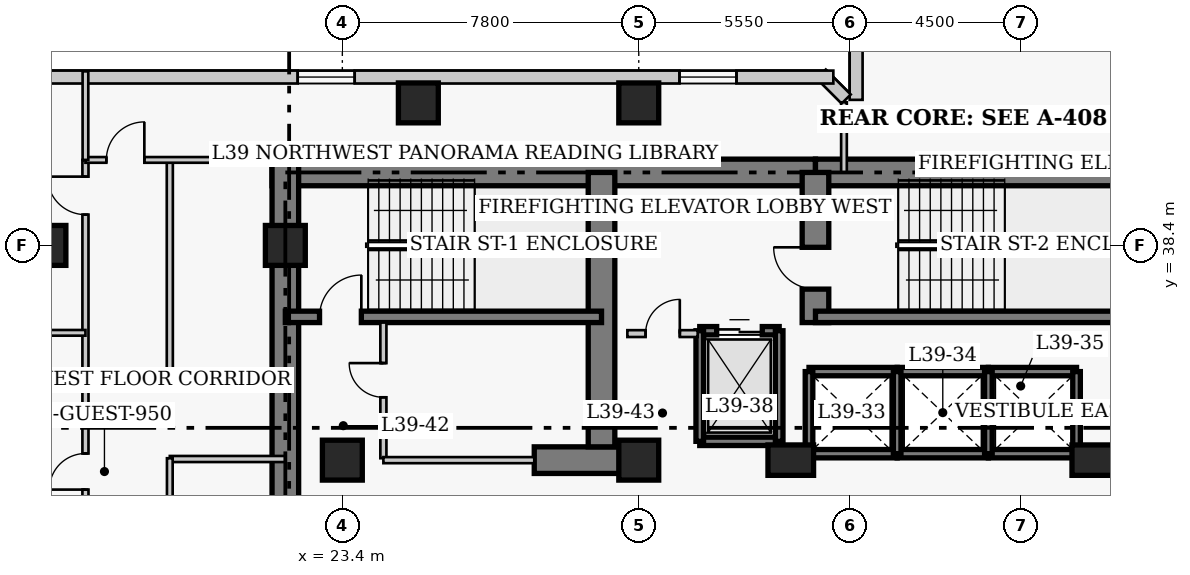
"""IFC4 building model, lengths in metres.
Left out: names, types, materials, properties, quantities, classifications, styles, units other than length and angle.
Written with IfcOpenShell. Run it as: python <this file> out.ifc"""

import sys

from ifc_helpers import new_model, si_unit, direction, frame, frame_2d, origin, origin_2d, place, context, subcontext, project, spatial, rectangle, extrude, element, fill, save


model = new_model("IFC4")
c1 = context("Model", 3, precision=1e-05, world=origin(), true_north=direction((0.0, 1.0)))
c2 = subcontext(c1, "Body", "Model", "MODEL_VIEW")
j1 = project(units=[si_unit("LENGTHUNIT", "METRE"), si_unit("PLANEANGLEUNIT", "RADIAN")], contexts=[c1])
p1 = place(None, origin())
s1 = spatial("IfcSite", under=j1, at=p1, CompositionType="ELEMENT")
p2 = place(p1, origin())
s2 = spatial("IfcBuilding", under=s1, at=p2, CompositionType="ELEMENT")
p3 = place(p2, frame((0.0, 0.0, 157.4)))
s3 = spatial("IfcBuildingStorey", under=s2, at=p3, CompositionType="ELEMENT", Elevation=157.4)
p4 = place(p3, frame((21.55, 40.32, 0.0), z_axis=(0.0, 0.0, 1.0), x_axis=(1.0, 0.0, 0.0)))
e1 = element("IfcWall", 1, at=p4, inside=s3, PredefinedType="SHEAR", context=c2, shape_type="SweptSolid", body=[
    extrude(rectangle(XDim=14.3, YDim=0.7, at=frame_2d((7.15, 0.0))), origin(), (0.0, 0.0, 1.0), 3.8),
])
p5 = place(p3, frame((35.85, 40.32, 0.0), z_axis=(0.0, 0.0, 1.0), x_axis=(1.0, 0.0, 0.0)))
e2 = element("IfcWall", 2, at=p5, inside=s3, PredefinedType="SHEAR", context=c2, shape_type="SweptSolid", body=[
    extrude(rectangle(XDim=12.6, YDim=0.7, at=frame_2d((6.3, 0.0))), origin(), (0.0, 0.0, 1.0), 3.8),
])
p6 = place(p3, frame((21.9, 27.05, 0.0), z_axis=(0.0, 0.0, 1.0), x_axis=(0.0, 1.0, 0.0)))
e3 = element("IfcWall", 3, at=p6, inside=s3, PredefinedType="SHEAR", context=c2, shape_type="SweptSolid", body=[
    extrude(rectangle(XDim=13.62, YDim=0.7, at=frame_2d((6.81, 0.0))), origin(), (0.0, 0.0, 1.0), 3.8),
])
p7 = place(p3, frame((28.45, 32.75, 0.0), z_axis=(0.0, 0.0, 1.0), x_axis=(1.0, 0.0, 0.0)))
e4 = element("IfcWall", 4, at=p7, inside=s3, PredefinedType="SHEAR", context=c2, shape_type="SweptSolid", body=[
    extrude(rectangle(XDim=2.4, YDim=0.7, at=frame_2d((1.2, 0.0))), origin(), (0.0, 0.0, 1.0), 3.8),
])
p8 = place(p3, frame((30.22, 33.1, 0.0), z_axis=(0.0, 0.0, 1.0), x_axis=(0.0, 1.0, 0.0)))
e5 = element("IfcWall", 5, at=p8, inside=s3, PredefinedType="SHEAR", context=c2, shape_type="SweptSolid", body=[
    extrude(rectangle(XDim=7.22, YDim=0.7, at=frame_2d((3.61, 0.0))), origin(), (0.0, 0.0, 1.0), 3.8),
])
p9 = place(p3, frame((35.85, 36.37, 0.0), z_axis=(0.0, 0.0, 1.0), x_axis=(0.0, 1.0, 0.0)))
e6 = element("IfcWall", 6, at=p9, inside=s3, PredefinedType="SHEAR", context=c2, shape_type="SweptSolid", body=[
    extrude(rectangle(XDim=3.95, YDim=0.7, at=frame_2d((1.975, 0.0))), origin(), (0.0, 0.0, 1.0), 3.8),
])
p10 = place(p9, frame((0.88, 0.0, 0.0)))
e7 = element("IfcOpeningElement", 7, at=p10, cuts=e6, PredefinedType="OPENING", context=c2, shape_type="SweptSolid", body=[
    extrude(rectangle(XDim=1.1, YDim=2.15, at=frame_2d((0.55, 1.075))), frame((0.0, 0.36, 0.0), z_axis=(0.0, -1.0, 0.0), x_axis=(1.0, 0.0, 0.0)), (0.0, 0.0, 1.0), 0.72),
])
p11 = place(p3, frame((21.9, 36.52, 0.0), z_axis=(0.0, 0.0, 1.0), x_axis=(1.0, 0.0, 0.0)))
e8 = element("IfcWall", 8, at=p11, inside=s3, PredefinedType="SHEAR", context=c2, shape_type="SweptSolid", body=[
    extrude(rectangle(XDim=8.32, YDim=0.3, at=frame_2d((4.16, 0.0))), origin(), (0.0, 0.0, 1.0), 3.8),
])
p12 = place(p11, frame((0.9, 0.0, 0.0)))
e9 = element("IfcOpeningElement", 9, at=p12, cuts=e8, PredefinedType="OPENING", context=c2, shape_type="SweptSolid", body=[
    extrude(rectangle(XDim=1.1, YDim=2.15, at=frame_2d((0.55, 1.075))), frame((0.0, 0.16, 0.0), z_axis=(0.0, -1.0, 0.0), x_axis=(1.0, 0.0, 0.0)), (0.0, 0.0, 1.0), 0.32),
])
p13 = place(p3, frame((35.85, 36.52, 0.0), z_axis=(0.0, 0.0, 1.0), x_axis=(1.0, 0.0, 0.0)))
e10 = element("IfcWall", 10, at=p13, inside=s3, PredefinedType="SHEAR", context=c2, shape_type="SweptSolid", body=[
    extrude(rectangle(XDim=8.33, YDim=0.3, at=frame_2d((4.165, 0.0))), origin(), (0.0, 0.0, 1.0), 3.8),
])
for number, where, z_axis, x_axis in (
    (11, (15.6, 38.4, 0.0), (0.0, 0.0, 1.0), (1.0, 0.0, 0.0)),
    (12, (21.9, 38.4, 0.0), (0.0, 0.0, 1.0), (1.0, 0.0, 0.0)),
    (13, (23.4, 32.75, 0.0), (0.0, 0.0, 1.0), (1.0, 0.0, 0.0)),
    (14, (31.2, 32.75, 0.0), (0.0, 0.0, 1.0), (1.0, 0.0, 0.0)),
):
    element("IfcColumn", number, at=place(p3, frame(where, z_axis=z_axis, x_axis=x_axis)), inside=s3, PredefinedType="COLUMN", context=c2, shape_type="SweptSolid", body=[
        extrude(rectangle(XDim=1.05, YDim=1.05, at=origin_2d()), origin(), (0.0, 0.0, 1.0), 3.8),
    ])
for number, where, z_axis, x_axis in (
    (15, (35.2, 32.75, 0.0), (0.0, 0.0, 1.0), (1.0, 0.0, 0.0)),
    (16, (43.2, 32.75, 0.0), (0.0, 0.0, 1.0), (1.0, 0.0, 0.0)),
):
    element("IfcColumn", number, at=place(p3, frame(where, z_axis=z_axis, x_axis=x_axis)), inside=s3, PredefinedType="COLUMN", context=c2, shape_type="SweptSolid", body=[
        extrude(rectangle(XDim=1.2, YDim=0.8, at=origin_2d()), origin(), (0.0, 0.0, 1.0), 3.8),
    ])
for number, where, z_axis, x_axis in (
    (17, (25.4, 42.15, 0.0), (0.0, 0.0, 1.0), (1.0, 0.0, 0.0)),
    (18, (31.2, 42.15, 0.0), (0.0, 0.0, 1.0), (1.0, 0.0, 0.0)),
):
    element("IfcColumn", number, at=place(p3, frame(where, z_axis=z_axis, x_axis=x_axis)), inside=s3, PredefinedType="COLUMN", context=c2, shape_type="SweptSolid", body=[
        extrude(rectangle(XDim=1.05, YDim=1.05, at=origin_2d()), origin(), (0.0, 0.0, 1.0), 3.8),
    ])
p14 = place(p3, frame((36.92, 44.37, 0.0), z_axis=(0.0, 0.0, 1.0), x_axis=(0.0, -1.0, 0.0)))
e19 = element("IfcWall", 19, at=p14, inside=s3, PredefinedType="SOLIDWALL", context=c2, shape_type="SweptSolid", body=[
    extrude(rectangle(XDim=2.14, YDim=0.34, at=frame_2d((1.07, 0.0))), origin(), (0.0, 0.0, 1.0), 3.55),
])
p15 = place(p3, frame((36.658, 42.251, 0.0), z_axis=(0.0, 0.0, 1.0), x_axis=(-0.707106781187, 0.707106781187, 0.0)))
e20 = element("IfcWall", 20, at=p15, inside=s3, PredefinedType="SOLIDWALL", context=c2, shape_type="SweptSolid", body=[
    extrude(rectangle(XDim=0.929, YDim=0.34, at=frame_2d((0.464, 0.0))), origin(), (0.0, 0.0, 1.0), 3.55),
])
p16 = place(p3, frame((36.32, 42.83, 0.0), z_axis=(0.0, 0.0, 1.0), x_axis=(-1.0, 0.0, 0.0)))
e21 = element("IfcWall", 21, at=p16, inside=s3, PredefinedType="SOLIDWALL", context=c2, shape_type="SweptSolid", body=[
    extrude(rectangle(XDim=26.69, YDim=0.34, at=frame_2d((13.345, 0.0))), origin(), (0.0, 0.0, 1.0), 3.55),
])
p17 = place(p16, frame((2.548, 0.0, 0.85)))
e22 = element("IfcOpeningElement", 22, at=p17, cuts=e21, PredefinedType="OPENING", context=c2, shape_type="SweptSolid", body=[
    extrude(rectangle(XDim=1.5, YDim=1.75, at=frame_2d((0.75, 0.875))), frame((0.0, 0.18, 0.0), z_axis=(0.0, -1.0, 0.0), x_axis=(1.0, 0.0, 0.0)), (0.0, 0.0, 1.0), 0.36),
])
p18 = place(p16, frame((12.595, 0.0, 0.85)))
e23 = element("IfcOpeningElement", 23, at=p18, cuts=e21, PredefinedType="OPENING", context=c2, shape_type="SweptSolid", body=[
    extrude(rectangle(XDim=1.5, YDim=1.75, at=frame_2d((0.75, 0.875))), frame((0.0, 0.18, 0.0), z_axis=(0.0, -1.0, 0.0), x_axis=(1.0, 0.0, 0.0)), (0.0, 0.0, 1.0), 0.36),
])
p19 = place(p16, frame((21.492, 0.0, 0.85)))
e24 = element("IfcOpeningElement", 24, at=p19, cuts=e21, PredefinedType="OPENING", context=c2, shape_type="SweptSolid", body=[
    extrude(rectangle(XDim=1.5, YDim=1.75, at=frame_2d((0.75, 0.875))), frame((0.0, 0.18, 0.0), z_axis=(0.0, -1.0, 0.0), x_axis=(1.0, 0.0, 0.0)), (0.0, 0.0, 1.0), 0.36),
])
for number, where, z_axis, x_axis in (
    (25, (35.68, 35.08, 0.0), (0.0, 0.0, 1.0), (1.0, 0.0, 0.0)),
    (26, (35.68, 32.92, 0.0), (0.0, 0.0, 1.0), (1.0, 0.0, 0.0)),
):
    element("IfcWall", number, at=place(p3, frame(where, z_axis=z_axis, x_axis=x_axis)), inside=s3, PredefinedType="SHEAR", context=c2, shape_type="SweptSolid", body=[
        extrude(rectangle(XDim=2.32, YDim=0.22, at=frame_2d((1.16, 0.0))), origin(), (0.0, 0.0, 1.0), 3.8),
    ])
p20 = place(p3, frame((35.68, 32.92, 0.0), z_axis=(0.0, 0.0, 1.0), x_axis=(0.0, 1.0, 0.0)))
e27 = element("IfcWall", 27, at=p20, inside=s3, PredefinedType="SHEAR", context=c2, shape_type="SweptSolid", body=[
    extrude(rectangle(XDim=2.16, YDim=0.2, at=frame_2d((1.08, 0.0))), origin(), (0.0, 0.0, 1.0), 3.8),
])
for number, where, z_axis, x_axis in (
    (28, (38.0, 35.08, 0.0), (0.0, 0.0, 1.0), (1.0, 0.0, 0.0)),
    (29, (38.0, 32.92, 0.0), (0.0, 0.0, 1.0), (1.0, 0.0, 0.0)),
):
    element("IfcWall", number, at=place(p3, frame(where, z_axis=z_axis, x_axis=x_axis)), inside=s3, PredefinedType="SHEAR", context=c2, shape_type="SweptSolid", body=[
        extrude(rectangle(XDim=2.4, YDim=0.22, at=frame_2d((1.2, 0.0))), origin(), (0.0, 0.0, 1.0), 3.8),
    ])
p21 = place(p3, frame((38.0, 32.92, 0.0), z_axis=(0.0, 0.0, 1.0), x_axis=(0.0, 1.0, 0.0)))
e30 = element("IfcWall", 30, at=p21, inside=s3, PredefinedType="SHEAR", context=c2, shape_type="SweptSolid", body=[
    extrude(rectangle(XDim=2.16, YDim=0.2, at=frame_2d((1.08, 0.0))), origin(), (0.0, 0.0, 1.0), 3.8),
])
for number, where, z_axis, x_axis in (
    (31, (40.4, 35.08, 0.0), (0.0, 0.0, 1.0), (1.0, 0.0, 0.0)),
    (32, (40.4, 32.92, 0.0), (0.0, 0.0, 1.0), (1.0, 0.0, 0.0)),
):
    element("IfcWall", number, at=place(p3, frame(where, z_axis=z_axis, x_axis=x_axis)), inside=s3, PredefinedType="SHEAR", context=c2, shape_type="SweptSolid", body=[
        extrude(rectangle(XDim=2.32, YDim=0.22, at=frame_2d((1.16, 0.0))), origin(), (0.0, 0.0, 1.0), 3.8),
    ])
for number, where, z_axis, x_axis in (
    (33, (40.4, 32.92, 0.0), (0.0, 0.0, 1.0), (0.0, 1.0, 0.0)),
    (34, (42.72, 32.92, 0.0), (0.0, 0.0, 1.0), (0.0, 1.0, 0.0)),
):
    element("IfcWall", number, at=place(p3, frame(where, z_axis=z_axis, x_axis=x_axis)), inside=s3, PredefinedType="SHEAR", context=c2, shape_type="SweptSolid", body=[
        extrude(rectangle(XDim=2.16, YDim=0.2, at=frame_2d((1.08, 0.0))), origin(), (0.0, 0.0, 1.0), 3.8),
    ])
p22 = place(p3, frame((32.805, 36.155, 0.0), z_axis=(0.0, 0.0, 1.0), x_axis=(1.0, 0.0, 0.0)))
e35 = element("IfcWall", 35, at=p22, inside=s3, PredefinedType="SHEAR", context=c2, shape_type="SweptSolid", body=[
    extrude(rectangle(XDim=2.09, YDim=0.22, at=frame_2d((1.045, 0.0))), origin(), (0.0, 0.0, 1.0), 3.8),
])
p23 = place(p22, frame((0.445, 0.0, 0.0)))
e36 = element("IfcOpeningElement", 36, at=p23, cuts=e35, PredefinedType="OPENING", context=c2, shape_type="SweptSolid", body=[
    extrude(rectangle(XDim=1.2, YDim=2.15, at=frame_2d((0.6, 1.075))), frame((0.0, 0.12, 0.0), z_axis=(0.0, -1.0, 0.0), x_axis=(1.0, 0.0, 0.0)), (0.0, 0.0, 1.0), 0.24),
])
p24 = place(p3, frame((32.805, 33.245, 0.0), z_axis=(0.0, 0.0, 1.0), x_axis=(1.0, 0.0, 0.0)))
e37 = element("IfcWall", 37, at=p24, inside=s3, PredefinedType="SHEAR", context=c2, shape_type="SweptSolid", body=[
    extrude(rectangle(XDim=2.09, YDim=0.22, at=frame_2d((1.045, 0.0))), origin(), (0.0, 0.0, 1.0), 3.8),
])
for number, where, z_axis, x_axis in (
    (38, (32.805, 33.245, 0.0), (0.0, 0.0, 1.0), (0.0, 1.0, 0.0)),
    (39, (34.895, 33.245, 0.0), (0.0, 0.0, 1.0), (0.0, 1.0, 0.0)),
):
    element("IfcWall", number, at=place(p3, frame(where, z_axis=z_axis, x_axis=x_axis)), inside=s3, PredefinedType="SHEAR", context=c2, shape_type="SweptSolid", body=[
        extrude(rectangle(XDim=2.91, YDim=0.2, at=frame_2d((1.455, 0.0))), origin(), (0.0, 0.0, 1.0), 3.8),
    ])
p25 = place(p3, frame((30.9, 36.08, 0.0), z_axis=(0.0, 0.0, 1.0), x_axis=(1.0, 0.0, 0.0)))
e40 = element("IfcWall", 40, at=p25, inside=s3, PredefinedType="PARTITIONING", context=c2, shape_type="SweptSolid", body=[
    extrude(rectangle(XDim=1.85, YDim=0.18, at=frame_2d((0.925, 0.0))), origin(), (0.0, 0.0, 1.0), 3.55),
])
p26 = place(p25, frame((0.48, 0.0, 0.0)))
e41 = element("IfcOpeningElement", 41, at=p26, cuts=e40, PredefinedType="OPENING", context=c2, shape_type="SweptSolid", body=[
    extrude(rectangle(XDim=0.9, YDim=2.15, at=frame_2d((0.45, 1.075))), frame((0.0, 0.1, 0.0), z_axis=(0.0, -1.0, 0.0), x_axis=(1.0, 0.0, 0.0)), (0.0, 0.0, 1.0), 0.2),
])
p27 = place(p3, frame((24.48, 32.8, 0.0), z_axis=(0.0, 0.0, 1.0), x_axis=(0.0, 1.0, 0.0)))
e42 = element("IfcWall", 42, at=p27, inside=s3, PredefinedType="PARTITIONING", context=c2, shape_type="SweptSolid", body=[
    extrude(rectangle(XDim=3.57, YDim=0.16, at=frame_2d((1.785, 0.0))), origin(), (0.0, 0.0, 1.0), 3.55),
])
p28 = place(p27, frame((1.604, 0.0, 0.0)))
e43 = element("IfcOpeningElement", 43, at=p28, cuts=e42, PredefinedType="OPENING", context=c2, shape_type="SweptSolid", body=[
    extrude(rectangle(XDim=0.9, YDim=2.1, at=frame_2d((0.45, 1.05))), frame((0.0, 0.09, 0.0), z_axis=(0.0, -1.0, 0.0), x_axis=(1.0, 0.0, 0.0)), (0.0, 0.0, 1.0), 0.18),
])
p29 = place(p3, frame((24.48, 32.75, 0.0), z_axis=(0.0, 0.0, 1.0), x_axis=(1.0, 0.0, 0.0)))
e44 = element("IfcWall", 44, at=p29, inside=s3, PredefinedType="PARTITIONING", context=c2, shape_type="SweptSolid", body=[
    extrude(rectangle(XDim=3.97, YDim=0.16, at=frame_2d((1.985, 0.0))), origin(), (0.0, 0.0, 1.0), 3.55),
])
p30 = place(p3, frame((16.64, 6.85, 0.0), z_axis=(0.0, 0.0, 1.0), x_axis=(0.0, 1.0, 0.0)))
e45 = element("IfcWall", 45, at=p30, inside=s3, PredefinedType="PARTITIONING", context=c2, shape_type="SweptSolid", body=[
    extrude(rectangle(XDim=33.8, YDim=0.16, at=frame_2d((16.9, 0.0))), origin(), (0.0, 0.0, 1.0), 3.55),
])
p31 = place(p30, frame((1.7, 0.0, 0.0)))
e46 = element("IfcOpeningElement", 46, at=p31, cuts=e45, PredefinedType="OPENING", context=c2, shape_type="SweptSolid", body=[
    extrude(rectangle(XDim=0.95, YDim=2.1, at=frame_2d((0.475, 1.05))), frame((0.0, 0.09, 0.0), z_axis=(0.0, -1.0, 0.0), x_axis=(1.0, 0.0, 0.0)), (0.0, 0.0, 1.0), 0.18),
])
p32 = place(p30, frame((8.275, 0.0, 0.0)))
e47 = element("IfcOpeningElement", 47, at=p32, cuts=e45, PredefinedType="OPENING", context=c2, shape_type="SweptSolid", body=[
    extrude(rectangle(XDim=0.95, YDim=2.1, at=frame_2d((0.475, 1.05))), frame((0.0, 0.09, 0.0), z_axis=(0.0, -1.0, 0.0), x_axis=(1.0, 0.0, 0.0)), (0.0, 0.0, 1.0), 0.18),
])
p33 = place(p30, frame((17.075, 0.0, 0.0)))
e48 = element("IfcOpeningElement", 48, at=p33, cuts=e45, PredefinedType="OPENING", context=c2, shape_type="SweptSolid", body=[
    extrude(rectangle(XDim=0.95, YDim=2.1, at=frame_2d((0.475, 1.05))), frame((0.0, 0.09, 0.0), z_axis=(0.0, -1.0, 0.0), x_axis=(1.0, 0.0, 0.0)), (0.0, 0.0, 1.0), 0.18),
])
p34 = place(p30, frame((25.125, 0.0, 0.0)))
e49 = element("IfcOpeningElement", 49, at=p34, cuts=e45, PredefinedType="OPENING", context=c2, shape_type="SweptSolid", body=[
    extrude(rectangle(XDim=0.95, YDim=2.1, at=frame_2d((0.475, 1.05))), frame((0.0, 0.09, 0.0), z_axis=(0.0, -1.0, 0.0), x_axis=(1.0, 0.0, 0.0)), (0.0, 0.0, 1.0), 0.18),
])
p35 = place(p30, frame((32.36, 0.0, 0.0)))
e50 = element("IfcOpeningElement", 50, at=p35, cuts=e45, PredefinedType="OPENING", context=c2, shape_type="SweptSolid", body=[
    extrude(rectangle(XDim=1.0, YDim=2.15, at=frame_2d((0.5, 1.075))), frame((0.0, 0.09, 0.0), z_axis=(0.0, -1.0, 0.0), x_axis=(1.0, 0.0, 0.0)), (0.0, 0.0, 1.0), 0.18),
])
p36 = place(p3, frame((18.86, 35.02, 0.0), z_axis=(0.0, 0.0, 1.0), x_axis=(0.0, 1.0, 0.0)))
e51 = element("IfcWall", 51, at=p36, inside=s3, PredefinedType="PARTITIONING", context=c2, shape_type="SweptSolid", body=[
    extrude(rectangle(XDim=5.63, YDim=0.16, at=frame_2d((2.815, 0.0))), origin(), (0.0, 0.0, 1.0), 3.55),
])
for number, where, z_axis, x_axis in (
    (52, (18.86, 35.02, 0.0), (0.0, 0.0, 1.0), (1.0, 0.0, 0.0)),
    (53, (18.86, 32.78, 0.0), (0.0, 0.0, 1.0), (1.0, 0.0, 0.0)),
):
    element("IfcWall", number, at=place(p3, frame(where, z_axis=z_axis, x_axis=x_axis)), inside=s3, PredefinedType="PARTITIONING", context=c2, shape_type="SweptSolid", body=[
        extrude(rectangle(XDim=3.04, YDim=0.16, at=frame_2d((1.52, 0.0))), origin(), (0.0, 0.0, 1.0), 3.55),
    ])
p37 = place(p3, frame((16.64, 40.65, 0.0), z_axis=(0.0, 0.0, 1.0), x_axis=(1.0, 0.0, 0.0)))
e54 = element("IfcWall", 54, at=p37, inside=s3, PredefinedType="PARTITIONING", context=c2, shape_type="SweptSolid", body=[
    extrude(rectangle(XDim=5.46, YDim=0.15, at=frame_2d((2.73, 0.0))), origin(), (0.0, 0.0, 1.0), 3.55),
])
p38 = place(p37, frame((0.55, 0.0, 0.0)))
e55 = element("IfcOpeningElement", 55, at=p38, cuts=e54, PredefinedType="OPENING", context=c2, shape_type="SweptSolid", body=[
    extrude(rectangle(XDim=1.0, YDim=2.15, at=frame_2d((0.5, 1.075))), frame((0.0, 0.085, 0.0), z_axis=(0.0, -1.0, 0.0), x_axis=(1.0, 0.0, 0.0)), (0.0, 0.0, 1.0), 0.17),
])
p39 = place(p3, frame((18.86, 17.96, 0.0), z_axis=(0.0, 0.0, 1.0), x_axis=(0.0, 1.0, 0.0)))
e56 = element("IfcWall", 56, at=p39, inside=s3, PredefinedType="PARTITIONING", context=c2, shape_type="SweptSolid", body=[
    extrude(rectangle(XDim=14.84, YDim=0.15, at=frame_2d((7.42, 0.0))), origin(), (0.0, 0.0, 1.0), 3.55),
])
p40 = place(p3, frame((16.64, 40.65, 0.0), z_axis=(0.0, 0.0, 1.0), x_axis=(0.0, 1.0, 0.0)))
e57 = element("IfcWall", 57, at=p40, inside=s3, PredefinedType="PARTITIONING", context=c2, shape_type="SweptSolid", body=[
    extrude(rectangle(XDim=2.33, YDim=0.15, at=frame_2d((1.165, 0.0))), origin(), (0.0, 0.0, 1.0), 3.55),
])
p41 = place(p3, frame((36.6, 40.32, 0.0), z_axis=(0.0, 0.0, 1.0), x_axis=(0.0, 1.0, 0.0)))
e58 = element("IfcWall", 58, at=p41, inside=s3, PredefinedType="PARTITIONING", context=c2, shape_type="SweptSolid", body=[
    extrude(rectangle(XDim=1.845, YDim=0.15, at=frame_2d((0.922, 0.0))), origin(), (0.0, 0.0, 1.0), 3.55),
])
p42 = place(p3, frame((14.45, 36.1, 0.0), z_axis=(0.0, 0.0, 1.0), x_axis=(1.0, 0.0, 0.0)))
e59 = element("IfcWall", 59, at=p42, inside=s3, PredefinedType="PARTITIONING", context=c2, shape_type="SweptSolid", body=[
    extrude(rectangle(XDim=2.19, YDim=0.15, at=frame_2d((1.095, 0.0))), origin(), (0.0, 0.0, 1.0), 3.55),
])
p43 = place(p17, origin())
e60 = element("IfcWindow", 60, at=p43, inside=s3, PartitioningType="SINGLE_PANEL", PredefinedType="WINDOW", context=c2, shape_type="SweptSolid", body=[
    extrude(rectangle(XDim=1.5, YDim=1.75, at=frame_2d((0.75, 0.875))), frame((0.0, 0.03, 0.0), z_axis=(0.0, -1.0, 0.0), x_axis=(1.0, 0.0, 0.0)), (0.0, 0.0, 1.0), 0.06),
])
fill(e22, e60)
p44 = place(p18, origin())
e61 = element("IfcWindow", 61, at=p44, inside=s3, PartitioningType="SINGLE_PANEL", PredefinedType="WINDOW", context=c2, shape_type="SweptSolid", body=[
    extrude(rectangle(XDim=1.5, YDim=1.75, at=frame_2d((0.75, 0.875))), frame((0.0, 0.03, 0.0), z_axis=(0.0, -1.0, 0.0), x_axis=(1.0, 0.0, 0.0)), (0.0, 0.0, 1.0), 0.06),
])
fill(e23, e61)
p45 = place(p23, origin())
e62 = element("IfcDoor", 62, at=p45, inside=s3, OperationType="DOUBLE_DOOR_SLIDING", PredefinedType="DOOR", context=c2, shape_type="SweptSolid", body=[
    extrude(rectangle(XDim=1.2, YDim=2.15, at=frame_2d((0.6, 1.075))), frame((0.0, 0.025, 0.0), z_axis=(0.0, -1.0, 0.0), x_axis=(1.0, 0.0, 0.0)), (0.0, 0.0, 1.0), 0.05),
])
fill(e36, e62)
p46 = place(p26, origin())
e63 = element("IfcDoor", 63, at=p46, inside=s3, OperationType="SINGLE_SWING_RIGHT", PredefinedType="DOOR", context=c2, shape_type="SweptSolid", body=[
    extrude(rectangle(XDim=0.9, YDim=2.15, at=frame_2d((0.45, 1.075))), frame((0.0, 0.025, 0.0), z_axis=(0.0, -1.0, 0.0), x_axis=(1.0, 0.0, 0.0)), (0.0, 0.0, 1.0), 0.05),
])
fill(e41, e63)
p47 = place(p28, origin())
e64 = element("IfcDoor", 64, at=p47, inside=s3, OperationType="SINGLE_SWING_RIGHT", PredefinedType="DOOR", context=c2, shape_type="SweptSolid", body=[
    extrude(rectangle(XDim=0.9, YDim=2.1, at=frame_2d((0.45, 1.05))), frame((0.0, 0.025, 0.0), z_axis=(0.0, -1.0, 0.0), x_axis=(1.0, 0.0, 0.0)), (0.0, 0.0, 1.0), 0.05),
])
fill(e43, e64)
p48 = place(p38, origin())
e65 = element("IfcDoor", 65, at=p48, inside=s3, OperationType="SINGLE_SWING_RIGHT", PredefinedType="DOOR", context=c2, shape_type="SweptSolid", body=[
    extrude(rectangle(XDim=1.0, YDim=2.15, at=frame_2d((0.5, 1.075))), frame((0.0, 0.025, 0.0), z_axis=(0.0, -1.0, 0.0), x_axis=(1.0, 0.0, 0.0)), (0.0, 0.0, 1.0), 0.05),
])
fill(e55, e65)
p49 = place(p34, origin())
e66 = element("IfcDoor", 66, at=p49, inside=s3, OperationType="SINGLE_SWING_LEFT", PredefinedType="DOOR", context=c2, shape_type="SweptSolid", body=[
    extrude(rectangle(XDim=0.95, YDim=2.1, at=frame_2d((0.475, 1.05))), frame((0.0, 0.025, 0.0), z_axis=(0.0, -1.0, 0.0), x_axis=(1.0, 0.0, 0.0)), (0.0, 0.0, 1.0), 0.05),
])
fill(e49, e66)
p50 = place(p35, origin())
e67 = element("IfcDoor", 67, at=p50, inside=s3, OperationType="SINGLE_SWING_RIGHT", PredefinedType="DOOR", context=c2, shape_type="SweptSolid", body=[
    extrude(rectangle(XDim=1.0, YDim=2.15, at=frame_2d((0.5, 1.075))), frame((0.0, 0.025, 0.0), z_axis=(0.0, -1.0, 0.0), x_axis=(1.0, 0.0, 0.0)), (0.0, 0.0, 1.0), 0.05),
])
fill(e50, e67)
p51 = place(p12, origin())
e68 = element("IfcDoor", 68, at=p51, inside=s3, OperationType="SINGLE_SWING_RIGHT", PredefinedType="DOOR", context=c2, shape_type="SweptSolid", body=[
    extrude(rectangle(XDim=1.1, YDim=2.15, at=frame_2d((0.55, 1.075))), frame((0.0, 0.025, 0.0), z_axis=(0.0, -1.0, 0.0), x_axis=(1.0, 0.0, 0.0)), (0.0, 0.0, 1.0), 0.05),
])
fill(e9, e68)
p52 = place(p10, origin())
e69 = element("IfcDoor", 69, at=p52, inside=s3, OperationType="SINGLE_SWING_RIGHT", PredefinedType="DOOR", context=c2, shape_type="SweptSolid", body=[
    extrude(rectangle(XDim=1.1, YDim=2.15, at=frame_2d((0.55, 1.075))), frame((0.0, 0.025, 0.0), z_axis=(0.0, -1.0, 0.0), x_axis=(1.0, 0.0, 0.0)), (0.0, 0.0, 1.0), 0.05),
])
fill(e7, e69)
save(model, sys.argv[1])
